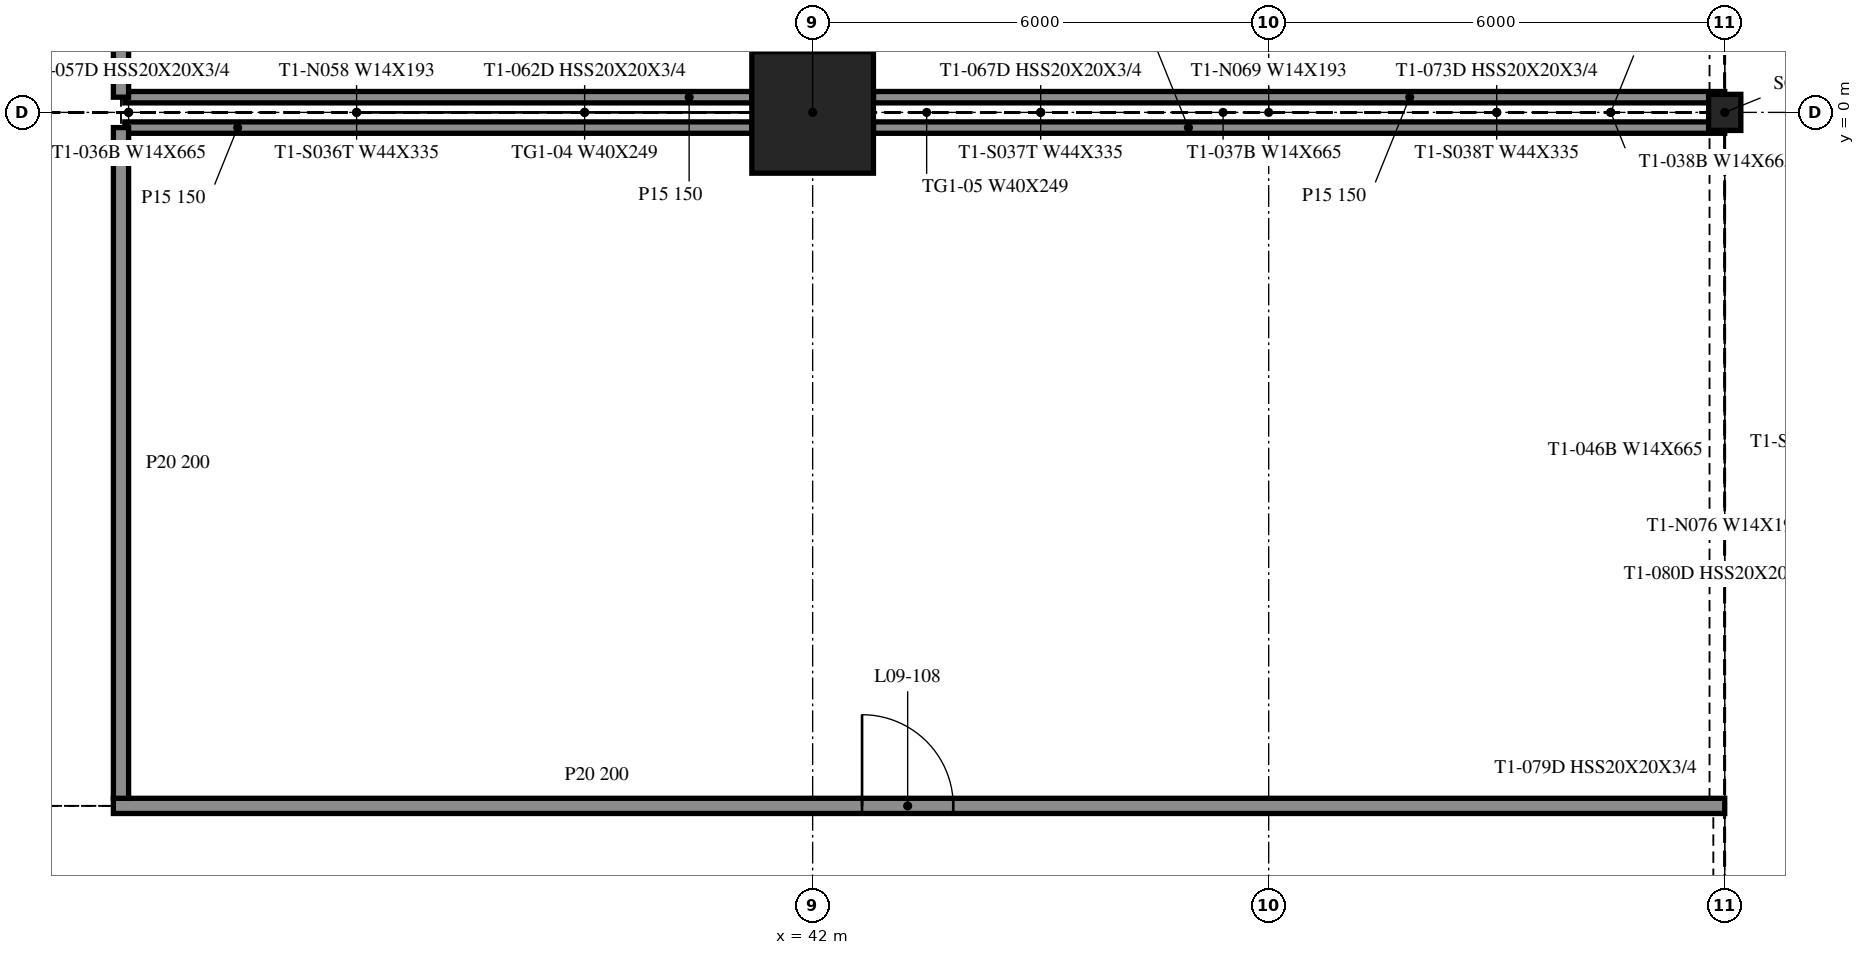
"""IFC4 building model, lengths in metres.
Left out: names, types, materials, properties, quantities, classifications, styles, units other than length and angle.
Written with IfcOpenShell. Run it as: python <this file> out.ifc"""

import sys

from ifc_helpers import new_model, si_unit, direction, frame, frame_2d, origin, origin_2d, place, context, subcontext, project, spatial, rectangle, i_section, extrude, element, fill, save


model = new_model("IFC4")
c1 = context("Model", 3, precision=1e-05, world=origin(), true_north=direction((0.0, 1.0)))
c2 = subcontext(c1, "Body", "Model", "MODEL_VIEW")
j1 = project(units=[si_unit("LENGTHUNIT", "METRE"), si_unit("PLANEANGLEUNIT", "RADIAN")], contexts=[c1])
p1 = place(None, origin())
s1 = spatial("IfcSite", under=j1, at=p1, CompositionType="ELEMENT")
p2 = place(p1, origin())
s2 = spatial("IfcBuilding", under=s1, at=p2, CompositionType="ELEMENT")
p3 = place(p2, frame((0.0, 0.0, 41.6)))
s3 = spatial("IfcBuildingStorey", under=s2, at=p3, CompositionType="ELEMENT", Elevation=41.6)
p4 = place(p3, frame((42.0, 0.0, -0.55), z_axis=(0.0, 0.0, 1.0), x_axis=(1.0, 0.0, 0.0)))
e1 = element("IfcColumn", 1, at=p4, inside=s3, PredefinedType="COLUMN", context=c2, shape_type="SweptSolid", body=[
    extrude(rectangle(XDim=1.6, YDim=1.6, at=origin_2d()), origin(), (0.0, 0.0, 1.0), 4.61),
])
p5 = place(p3, frame((54.0, 0.0, -0.55), z_axis=(0.0, 0.0, 1.0), x_axis=(1.0, 0.0, 0.0)))
e2 = element("IfcColumn", 2, at=p5, inside=s3, PredefinedType="COLUMN", context=c2, shape_type="SweptSolid", body=[
    extrude(i_section(OverallWidth=0.424, OverallDepth=0.475, WebThickness=0.048, FlangeThickness=0.077, at=origin_2d()), origin(), (0.0, 0.0, 1.0), 4.61),
])
p6 = place(p3, frame((32.8, -9.125, 0.0), z_axis=(0.0, 0.0, 1.0), x_axis=(1.0, 0.0, 0.0)))
e3 = element("IfcWall", 3, at=p6, inside=s3, PredefinedType="PARTITIONING", context=c2, shape_type="SweptSolid", body=[
    extrude(rectangle(XDim=21.2, YDim=0.2, at=frame_2d((10.6, 0.0))), origin(), (0.0, 0.0, 1.0), 4.06),
])
p7 = place(p6, frame((9.85, 0.0, 0.0)))
e4 = element("IfcOpeningElement", 4, at=p7, cuts=e3, PredefinedType="OPENING", context=c2, shape_type="SweptSolid", body=[
    extrude(rectangle(XDim=1.2, YDim=2.1, at=frame_2d((0.6, 1.05))), frame((0.0, 0.11, 0.0), z_axis=(0.0, -1.0, 0.0), x_axis=(1.0, 0.0, 0.0)), (0.0, 0.0, 1.0), 0.22),
])
p8 = place(p3, frame((32.95, -0.2, 0.0), z_axis=(0.0, 0.0, 1.0), x_axis=(1.0, 0.0, 0.0)))
e5 = element("IfcWall", 5, at=p8, inside=s3, PredefinedType="PARTITIONING", context=c2, shape_type="SweptSolid", body=[
    extrude(rectangle(XDim=8.25, YDim=0.15, at=frame_2d((4.125, 0.0))), origin(), (0.0, 0.0, 1.0), 4.06),
])
p9 = place(p3, frame((42.8, -0.2, 0.0), z_axis=(0.0, 0.0, 1.0), x_axis=(1.0, 0.0, 0.0)))
e6 = element("IfcWall", 6, at=p9, inside=s3, PredefinedType="PARTITIONING", context=c2, shape_type="SweptSolid", body=[
    extrude(rectangle(XDim=11.2, YDim=0.15, at=frame_2d((5.6, 0.0))), origin(), (0.0, 0.0, 1.0), 4.06),
])
p10 = place(p3, frame((32.95, 0.2, 0.0), z_axis=(0.0, 0.0, 1.0), x_axis=(1.0, 0.0, 0.0)))
e7 = element("IfcWall", 7, at=p10, inside=s3, PredefinedType="PARTITIONING", context=c2, shape_type="SweptSolid", body=[
    extrude(rectangle(XDim=8.25, YDim=0.15, at=frame_2d((4.125, 0.0))), origin(), (0.0, 0.0, 1.0), 4.06),
])
p11 = place(p3, frame((42.8, 0.2, 0.0), z_axis=(0.0, 0.0, 1.0), x_axis=(1.0, 0.0, 0.0)))
e8 = element("IfcWall", 8, at=p11, inside=s3, PredefinedType="PARTITIONING", context=c2, shape_type="SweptSolid", body=[
    extrude(rectangle(XDim=11.2, YDim=0.15, at=frame_2d((5.6, 0.0))), origin(), (0.0, 0.0, 1.0), 4.06),
])
p12 = place(p3, frame((32.9, -9.025, 0.0), z_axis=(0.0, 0.0, 1.0), x_axis=(0.0, 1.0, 0.0)))
e9 = element("IfcWall", 9, at=p12, inside=s3, PredefinedType="PARTITIONING", context=c2, shape_type="SweptSolid", body=[
    extrude(rectangle(XDim=8.825, YDim=0.2, at=frame_2d((4.413, 0.0))), origin(), (0.0, 0.0, 1.0), 4.06),
])
p13 = place(p3, frame((32.9, 0.2, 0.0), z_axis=(0.0, 0.0, 1.0), x_axis=(0.0, 1.0, 0.0)))
e10 = element("IfcWall", 10, at=p13, inside=s3, PredefinedType="PARTITIONING", context=c2, shape_type="SweptSolid", body=[
    extrude(rectangle(XDim=11.1, YDim=0.2, at=frame_2d((5.55, 0.0))), origin(), (0.0, 0.0, 1.0), 4.06),
])
p14 = place(p13, frame((5.1, 0.0, 0.0)))
e11 = element("IfcOpeningElement", 11, at=p14, cuts=e10, PredefinedType="OPENING", context=c2, shape_type="SweptSolid", body=[
    extrude(rectangle(XDim=1.0, YDim=2.1, at=frame_2d((0.5, 1.05))), frame((0.0, 0.11, 0.0), z_axis=(0.0, -1.0, 0.0), x_axis=(1.0, 0.0, 0.0)), (0.0, 0.0, 1.0), 0.22),
])
p15 = place(p7, origin())
e12 = element("IfcDoor", 12, at=p15, inside=s3, OperationType="SINGLE_SWING_LEFT", PredefinedType="DOOR", context=c2, shape_type="SweptSolid", body=[
    extrude(rectangle(XDim=1.2, YDim=2.1, at=frame_2d((0.6, 1.05))), frame((0.0, 0.025, 0.0), z_axis=(0.0, -1.0, 0.0), x_axis=(1.0, 0.0, 0.0)), (0.0, 0.0, 1.0), 0.05),
])
fill(e4, e12)
save(model, sys.argv[1])
